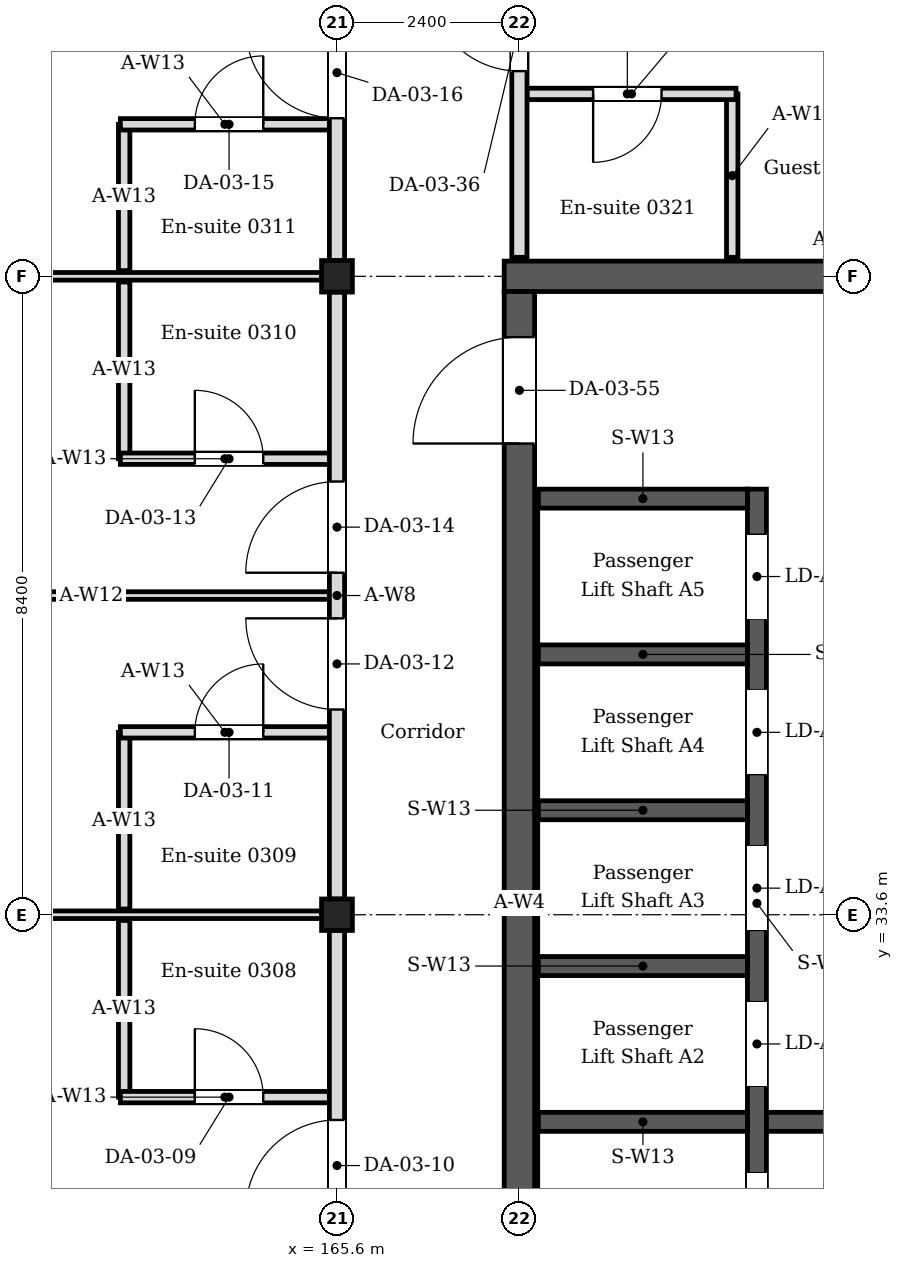
"""IFC4 building model, lengths in metres.
Left out: names, types, materials, properties, quantities, classifications, styles, units other than length and angle.
Written with IfcOpenShell. Run it as: python <this file> out.ifc"""

import sys

from ifc_helpers import new_model, si_unit, direction, frame, frame_2d, origin, origin_2d, place, context, subcontext, project, spatial, rectangle, i_section, extrude, element, fill, save


model = new_model("IFC4")
c1 = context("Model", 3, precision=1e-05, world=origin(), true_north=direction((0.0, 1.0)))
c2 = subcontext(c1, "Body", "Model", "MODEL_VIEW")
j1 = project(units=[si_unit("LENGTHUNIT", "METRE"), si_unit("PLANEANGLEUNIT", "RADIAN")], contexts=[c1])
p1 = place(None, origin())
s1 = spatial("IfcSite", under=j1, at=p1, CompositionType="ELEMENT")
p2 = place(p1, origin())
s2 = spatial("IfcBuilding", under=s1, at=p2, CompositionType="ELEMENT")
p3 = place(p2, frame((0.0, 0.0, 14.4)))
s3 = spatial("IfcBuildingStorey", under=s2, at=p3, CompositionType="ELEMENT", Elevation=14.4)
for number, where, z_axis, x_axis in (
    (1, (165.6, 33.6, 0.0), (0.0, 0.0, 1.0), (1.0, 0.0, 0.0)),
    (2, (165.6, 42.0, 0.0), (0.0, 0.0, 1.0), (1.0, 0.0, 0.0)),
):
    element("IfcColumn", number, at=place(p3, frame(where, z_axis=z_axis, x_axis=x_axis)), inside=s3, PredefinedType="COLUMN", context=c2, shape_type="SweptSolid", body=[
        extrude(i_section(OverallWidth=0.405, OverallDepth=0.414, WebThickness=0.018, FlangeThickness=0.028, FilletRadius=0.022, at=origin_2d()), origin(), (0.0, 0.0, 1.0), 4.2),
    ])
p4 = place(p3, frame((167.8, 42.0, 0.0), z_axis=(0.0, 0.0, 1.0), x_axis=(1.0, 0.0, 0.0)))
e3 = element("IfcWall", 3, at=p4, inside=s3, PredefinedType="SOLIDWALL", context=c2, shape_type="SweptSolid", body=[
    extrude(rectangle(XDim=8.8, YDim=0.4, at=frame_2d((4.4, 0.0))), origin(), (0.0, 0.0, 1.0), 4.05),
])
p5 = place(p3, frame((168.0, 25.4, 0.0), z_axis=(0.0, 0.0, 1.0), x_axis=(0.0, 1.0, 0.0)))
e4 = element("IfcWall", 4, at=p5, inside=s3, PredefinedType="SOLIDWALL", context=c2, shape_type="SweptSolid", body=[
    extrude(rectangle(XDim=16.4, YDim=0.4, at=frame_2d((8.2, 0.0))), origin(), (0.0, 0.0, 1.0), 4.05),
])
p6 = place(p5, frame((1.0, 0.0, 0.0)))
e5 = element("IfcOpeningElement", 5, at=p6, cuts=e4, PredefinedType="OPENING", context=c2, shape_type="SweptSolid", body=[
    extrude(rectangle(XDim=1.0, YDim=2.1, at=frame_2d((0.5, 1.05))), frame((0.0, 0.21, 0.0), z_axis=(0.0, -1.0, 0.0), x_axis=(1.0, 0.0, 0.0)), (0.0, 0.0, 1.0), 0.42),
])
p7 = place(p5, frame((14.4, 0.0, 0.0)))
e6 = element("IfcOpeningElement", 6, at=p7, cuts=e4, PredefinedType="OPENING", context=c2, shape_type="SweptSolid", body=[
    extrude(rectangle(XDim=1.4, YDim=2.1, at=frame_2d((0.7, 1.05))), frame((0.0, 0.21, 0.0), z_axis=(0.0, -1.0, 0.0), x_axis=(1.0, 0.0, 0.0)), (0.0, 0.0, 1.0), 0.42),
])
p8 = place(p3, frame((162.8, 31.2, 0.0), z_axis=(0.0, 0.0, 1.0), x_axis=(0.0, 1.0, 0.0)))
e7 = element("IfcWall", 7, at=p8, inside=s3, PredefinedType="PARTITIONING", context=c2, shape_type="SweptSolid", body=[
    extrude(rectangle(XDim=2.325, YDim=0.15, at=frame_2d((1.163, 0.0))), origin(), (0.0, 0.0, 1.0), 4.05),
])
p9 = place(p3, frame((162.75, 31.2, 0.0), z_axis=(0.0, 0.0, 1.0), x_axis=(1.0, 0.0, 0.0)))
e8 = element("IfcWall", 8, at=p9, inside=s3, PredefinedType="PARTITIONING", context=c2, shape_type="SweptSolid", body=[
    extrude(rectangle(XDim=2.75, YDim=0.15, at=frame_2d((1.375, 0.0))), origin(), (0.0, 0.0, 1.0), 4.05),
])
p10 = place(p9, frame((0.98, 0.0, 0.0)))
e9 = element("IfcOpeningElement", 9, at=p10, cuts=e8, PredefinedType="OPENING", context=c2, shape_type="SweptSolid", body=[
    extrude(rectangle(XDim=0.9, YDim=2.1, at=frame_2d((0.45, 1.05))), frame((0.0, 0.085, 0.0), z_axis=(0.0, -1.0, 0.0), x_axis=(1.0, 0.0, 0.0)), (0.0, 0.0, 1.0), 0.17),
])
p11 = place(p3, frame((162.8, 33.675, 0.0), z_axis=(0.0, 0.0, 1.0), x_axis=(0.0, 1.0, 0.0)))
e10 = element("IfcWall", 10, at=p11, inside=s3, PredefinedType="PARTITIONING", context=c2, shape_type="SweptSolid", body=[
    extrude(rectangle(XDim=2.325, YDim=0.15, at=frame_2d((1.163, 0.0))), origin(), (0.0, 0.0, 1.0), 4.05),
])
p12 = place(p3, frame((162.75, 36.0, 0.0), z_axis=(0.0, 0.0, 1.0), x_axis=(1.0, 0.0, 0.0)))
e11 = element("IfcWall", 11, at=p12, inside=s3, PredefinedType="PARTITIONING", context=c2, shape_type="SweptSolid", body=[
    extrude(rectangle(XDim=2.75, YDim=0.15, at=frame_2d((1.375, 0.0))), origin(), (0.0, 0.0, 1.0), 4.05),
])
p13 = place(p12, frame((0.98, 0.0, 0.0)))
e12 = element("IfcOpeningElement", 12, at=p13, cuts=e11, PredefinedType="OPENING", context=c2, shape_type="SweptSolid", body=[
    extrude(rectangle(XDim=0.9, YDim=2.1, at=frame_2d((0.45, 1.05))), frame((0.0, 0.085, 0.0), z_axis=(0.0, -1.0, 0.0), x_axis=(1.0, 0.0, 0.0)), (0.0, 0.0, 1.0), 0.17),
])
p14 = place(p3, frame((162.8, 39.6, 0.0), z_axis=(0.0, 0.0, 1.0), x_axis=(0.0, 1.0, 0.0)))
e13 = element("IfcWall", 13, at=p14, inside=s3, PredefinedType="PARTITIONING", context=c2, shape_type="SweptSolid", body=[
    extrude(rectangle(XDim=2.325, YDim=0.15, at=frame_2d((1.163, 0.0))), origin(), (0.0, 0.0, 1.0), 4.05),
])
p15 = place(p3, frame((162.75, 39.6, 0.0), z_axis=(0.0, 0.0, 1.0), x_axis=(1.0, 0.0, 0.0)))
e14 = element("IfcWall", 14, at=p15, inside=s3, PredefinedType="PARTITIONING", context=c2, shape_type="SweptSolid", body=[
    extrude(rectangle(XDim=2.75, YDim=0.15, at=frame_2d((1.375, 0.0))), origin(), (0.0, 0.0, 1.0), 4.05),
])
p16 = place(p15, frame((0.98, 0.0, 0.0)))
e15 = element("IfcOpeningElement", 15, at=p16, cuts=e14, PredefinedType="OPENING", context=c2, shape_type="SweptSolid", body=[
    extrude(rectangle(XDim=0.9, YDim=2.1, at=frame_2d((0.45, 1.05))), frame((0.0, 0.085, 0.0), z_axis=(0.0, -1.0, 0.0), x_axis=(1.0, 0.0, 0.0)), (0.0, 0.0, 1.0), 0.17),
])
p17 = place(p3, frame((162.8, 42.075, 0.0), z_axis=(0.0, 0.0, 1.0), x_axis=(0.0, 1.0, 0.0)))
e16 = element("IfcWall", 16, at=p17, inside=s3, PredefinedType="PARTITIONING", context=c2, shape_type="SweptSolid", body=[
    extrude(rectangle(XDim=1.925, YDim=0.15, at=frame_2d((0.962, 0.0))), origin(), (0.0, 0.0, 1.0), 4.05),
])
p18 = place(p3, frame((162.75, 44.0, 0.0), z_axis=(0.0, 0.0, 1.0), x_axis=(1.0, 0.0, 0.0)))
e17 = element("IfcWall", 17, at=p18, inside=s3, PredefinedType="PARTITIONING", context=c2, shape_type="SweptSolid", body=[
    extrude(rectangle(XDim=2.75, YDim=0.15, at=frame_2d((1.375, 0.0))), origin(), (0.0, 0.0, 1.0), 4.05),
])
p19 = place(p18, frame((0.98, 0.0, 0.0)))
e18 = element("IfcOpeningElement", 18, at=p19, cuts=e17, PredefinedType="OPENING", context=c2, shape_type="SweptSolid", body=[
    extrude(rectangle(XDim=0.9, YDim=2.1, at=frame_2d((0.45, 1.05))), frame((0.0, 0.085, 0.0), z_axis=(0.0, -1.0, 0.0), x_axis=(1.0, 0.0, 0.0)), (0.0, 0.0, 1.0), 0.17),
])
p20 = place(p3, frame((170.8, 42.25, 0.0), z_axis=(0.0, 0.0, 1.0), x_axis=(0.0, 1.0, 0.0)))
e19 = element("IfcWall", 19, at=p20, inside=s3, PredefinedType="PARTITIONING", context=c2, shape_type="SweptSolid", body=[
    extrude(rectangle(XDim=2.15, YDim=0.15, at=frame_2d((1.075, 0.0))), origin(), (0.0, 0.0, 1.0), 4.05),
])
p21 = place(p3, frame((170.85, 44.4, 0.0), z_axis=(0.0, 0.0, 1.0), x_axis=(-1.0, 0.0, 0.0)))
e20 = element("IfcWall", 20, at=p21, inside=s3, PredefinedType="PARTITIONING", context=c2, shape_type="SweptSolid", body=[
    extrude(rectangle(XDim=2.75, YDim=0.15, at=frame_2d((1.375, 0.0))), origin(), (0.0, 0.0, 1.0), 4.05),
])
p22 = place(p21, frame((0.98, 0.0, 0.0)))
e21 = element("IfcOpeningElement", 21, at=p22, cuts=e20, PredefinedType="OPENING", context=c2, shape_type="SweptSolid", body=[
    extrude(rectangle(XDim=0.9, YDim=2.1, at=frame_2d((0.45, 1.05))), frame((0.0, 0.085, 0.0), z_axis=(0.0, -1.0, 0.0), x_axis=(1.0, 0.0, 0.0)), (0.0, 0.0, 1.0), 0.17),
])
for number, where, z_axis, x_axis in (
    (22, (157.403, 33.6, 0.0), (0.0, 0.0, 1.0), (1.0, 0.0, 0.0)),
    (23, (157.403, 42.0, 0.0), (0.0, 0.0, 1.0), (1.0, 0.0, 0.0)),
):
    element("IfcWall", number, at=place(p3, frame(where, z_axis=z_axis, x_axis=x_axis)), inside=s3, PredefinedType="PARTITIONING", context=c2, shape_type="SweptSolid", body=[
        extrude(rectangle(XDim=7.995, YDim=0.1, at=frame_2d((3.998, 0.0))), origin(), (0.0, 0.0, 1.0), 3.604),
    ])
p23 = place(p3, frame((159.24, 37.8, 0.0), z_axis=(0.0, 0.0, 1.0), x_axis=(1.0, 0.0, 0.0)))
e24 = element("IfcWall", 24, at=p23, inside=s3, PredefinedType="PARTITIONING", context=c2, shape_type="SweptSolid", body=[
    extrude(rectangle(XDim=6.26, YDim=0.1, at=frame_2d((3.13, 0.0))), origin(), (0.0, 0.0, 1.0), 3.604),
])
p24 = place(p3, frame((165.6, 25.407, 0.0), z_axis=(0.0, 0.0, 1.0), x_axis=(0.0, 1.0, 0.0)))
e25 = element("IfcWall", 25, at=p24, inside=s3, PredefinedType="PARTITIONING", context=c2, shape_type="SweptSolid", body=[
    extrude(rectangle(XDim=7.986, YDim=0.2, at=frame_2d((3.993, 0.0))), origin(), (0.0, 0.0, 1.0), 3.45),
])
p25 = place(p24, frame((2.493, 0.0, 0.0)))
e26 = element("IfcOpeningElement", 26, at=p25, cuts=e25, PredefinedType="OPENING", context=c2, shape_type="SweptSolid", body=[
    extrude(rectangle(XDim=1.2, YDim=2.1, at=frame_2d((0.6, 1.05))), frame((0.0, 0.11, 0.0), z_axis=(0.0, -1.0, 0.0), x_axis=(1.0, 0.0, 0.0)), (0.0, 0.0, 1.0), 0.22),
])
p26 = place(p24, frame((4.293, 0.0, 0.0)))
e27 = element("IfcOpeningElement", 27, at=p26, cuts=e25, PredefinedType="OPENING", context=c2, shape_type="SweptSolid", body=[
    extrude(rectangle(XDim=1.2, YDim=2.1, at=frame_2d((0.6, 1.05))), frame((0.0, 0.11, 0.0), z_axis=(0.0, -1.0, 0.0), x_axis=(1.0, 0.0, 0.0)), (0.0, 0.0, 1.0), 0.22),
])
p27 = place(p3, frame((165.6, 33.807, 0.0), z_axis=(0.0, 0.0, 1.0), x_axis=(0.0, 1.0, 0.0)))
e28 = element("IfcWall", 28, at=p27, inside=s3, PredefinedType="PARTITIONING", context=c2, shape_type="SweptSolid", body=[
    extrude(rectangle(XDim=7.986, YDim=0.2, at=frame_2d((3.993, 0.0))), origin(), (0.0, 0.0, 1.0), 3.45),
])
p28 = place(p27, frame((2.493, 0.0, 0.0)))
e29 = element("IfcOpeningElement", 29, at=p28, cuts=e28, PredefinedType="OPENING", context=c2, shape_type="SweptSolid", body=[
    extrude(rectangle(XDim=1.2, YDim=2.1, at=frame_2d((0.6, 1.05))), frame((0.0, 0.11, 0.0), z_axis=(0.0, -1.0, 0.0), x_axis=(1.0, 0.0, 0.0)), (0.0, 0.0, 1.0), 0.22),
])
p29 = place(p27, frame((4.293, 0.0, 0.0)))
e30 = element("IfcOpeningElement", 30, at=p29, cuts=e28, PredefinedType="OPENING", context=c2, shape_type="SweptSolid", body=[
    extrude(rectangle(XDim=1.2, YDim=2.1, at=frame_2d((0.6, 1.05))), frame((0.0, 0.11, 0.0), z_axis=(0.0, -1.0, 0.0), x_axis=(1.0, 0.0, 0.0)), (0.0, 0.0, 1.0), 0.22),
])
p30 = place(p3, frame((165.6, 42.207, 0.0), z_axis=(0.0, 0.0, 1.0), x_axis=(0.0, 1.0, 0.0)))
e31 = element("IfcWall", 31, at=p30, inside=s3, PredefinedType="PARTITIONING", context=c2, shape_type="SweptSolid", body=[
    extrude(rectangle(XDim=7.986, YDim=0.2, at=frame_2d((3.993, 0.0))), origin(), (0.0, 0.0, 1.0), 3.45),
])
p31 = place(p30, frame((1.873, 0.0, 0.0)))
e32 = element("IfcOpeningElement", 32, at=p31, cuts=e31, PredefinedType="OPENING", context=c2, shape_type="SweptSolid", body=[
    extrude(rectangle(XDim=1.2, YDim=2.1, at=frame_2d((0.6, 1.05))), frame((0.0, 0.11, 0.0), z_axis=(0.0, -1.0, 0.0), x_axis=(1.0, 0.0, 0.0)), (0.0, 0.0, 1.0), 0.22),
])
p32 = place(p30, frame((3.873, 0.0, 0.0)))
e33 = element("IfcOpeningElement", 33, at=p32, cuts=e31, PredefinedType="OPENING", context=c2, shape_type="SweptSolid", body=[
    extrude(rectangle(XDim=1.2, YDim=2.1, at=frame_2d((0.6, 1.05))), frame((0.0, 0.11, 0.0), z_axis=(0.0, -1.0, 0.0), x_axis=(1.0, 0.0, 0.0)), (0.0, 0.0, 1.0), 0.22),
])
p33 = place(p3, frame((168.0, 42.25, 0.0), z_axis=(0.0, 0.0, 1.0), x_axis=(0.0, 1.0, 0.0)))
e34 = element("IfcWall", 34, at=p33, inside=s3, PredefinedType="PARTITIONING", context=c2, shape_type="SweptSolid", body=[
    extrude(rectangle(XDim=7.943, YDim=0.2, at=frame_2d((3.972, 0.0))), origin(), (0.0, 0.0, 1.0), 3.45),
])
p34 = place(p33, frame((2.45, 0.0, 0.0)))
e35 = element("IfcOpeningElement", 35, at=p34, cuts=e34, PredefinedType="OPENING", context=c2, shape_type="SweptSolid", body=[
    extrude(rectangle(XDim=1.2, YDim=2.1, at=frame_2d((0.6, 1.05))), frame((0.0, 0.11, 0.0), z_axis=(0.0, -1.0, 0.0), x_axis=(1.0, 0.0, 0.0)), (0.0, 0.0, 1.0), 0.22),
])
p35 = place(p33, frame((4.25, 0.0, 0.0)))
e36 = element("IfcOpeningElement", 36, at=p35, cuts=e34, PredefinedType="OPENING", context=c2, shape_type="SweptSolid", body=[
    extrude(rectangle(XDim=1.2, YDim=2.1, at=frame_2d((0.6, 1.05))), frame((0.0, 0.11, 0.0), z_axis=(0.0, -1.0, 0.0), x_axis=(1.0, 0.0, 0.0)), (0.0, 0.0, 1.0), 0.22),
])
p36 = place(p3, frame((171.125, 28.3, 0.0), z_axis=(0.0, 0.0, 1.0), x_axis=(0.0, 1.0, 0.0)))
e37 = element("IfcWall", 37, at=p36, inside=s3, PredefinedType="SOLIDWALL", context=c2, shape_type="SweptSolid", body=[
    extrude(rectangle(XDim=10.9, YDim=0.25, at=frame_2d((5.45, 0.0))), origin(), (0.0, 0.0, 1.0), 4.05),
])
p37 = place(p36, frame((0.8, 0.0, 0.0)))
e38 = element("IfcOpeningElement", 38, at=p37, cuts=e37, PredefinedType="OPENING", context=c2, shape_type="SweptSolid", body=[
    extrude(rectangle(XDim=1.1, YDim=2.1, at=frame_2d((0.55, 1.05))), frame((0.0, 0.135, 0.0), z_axis=(0.0, -1.0, 0.0), x_axis=(1.0, 0.0, 0.0)), (0.0, 0.0, 1.0), 0.27),
])
p38 = place(p36, frame((3.05, 0.0, 0.0)))
e39 = element("IfcOpeningElement", 39, at=p38, cuts=e37, PredefinedType="OPENING", context=c2, shape_type="SweptSolid", body=[
    extrude(rectangle(XDim=1.1, YDim=2.1, at=frame_2d((0.55, 1.05))), frame((0.0, 0.135, 0.0), z_axis=(0.0, -1.0, 0.0), x_axis=(1.0, 0.0, 0.0)), (0.0, 0.0, 1.0), 0.27),
])
p39 = place(p36, frame((5.1, 0.0, 0.0)))
e40 = element("IfcOpeningElement", 40, at=p39, cuts=e37, PredefinedType="OPENING", context=c2, shape_type="SweptSolid", body=[
    extrude(rectangle(XDim=1.1, YDim=2.1, at=frame_2d((0.55, 1.05))), frame((0.0, 0.135, 0.0), z_axis=(0.0, -1.0, 0.0), x_axis=(1.0, 0.0, 0.0)), (0.0, 0.0, 1.0), 0.27),
])
p40 = place(p36, frame((7.15, 0.0, 0.0)))
e41 = element("IfcOpeningElement", 41, at=p40, cuts=e37, PredefinedType="OPENING", context=c2, shape_type="SweptSolid", body=[
    extrude(rectangle(XDim=1.1, YDim=2.1, at=frame_2d((0.55, 1.05))), frame((0.0, 0.135, 0.0), z_axis=(0.0, -1.0, 0.0), x_axis=(1.0, 0.0, 0.0)), (0.0, 0.0, 1.0), 0.27),
])
p41 = place(p36, frame((9.2, 0.0, 0.0)))
e42 = element("IfcOpeningElement", 42, at=p41, cuts=e37, PredefinedType="OPENING", context=c2, shape_type="SweptSolid", body=[
    extrude(rectangle(XDim=1.1, YDim=2.1, at=frame_2d((0.55, 1.05))), frame((0.0, 0.135, 0.0), z_axis=(0.0, -1.0, 0.0), x_axis=(1.0, 0.0, 0.0)), (0.0, 0.0, 1.0), 0.27),
])
for number, where, z_axis, x_axis in (
    (43, (168.25, 30.875, 0.0), (0.0, 0.0, 1.0), (1.0, 0.0, 0.0)),
    (44, (168.25, 32.925, 0.0), (0.0, 0.0, 1.0), (1.0, 0.0, 0.0)),
    (45, (168.25, 34.975, 0.0), (0.0, 0.0, 1.0), (1.0, 0.0, 0.0)),
    (46, (168.25, 37.025, 0.0), (0.0, 0.0, 1.0), (1.0, 0.0, 0.0)),
    (47, (168.25, 39.075, 0.0), (0.0, 0.0, 1.0), (1.0, 0.0, 0.0)),
):
    element("IfcWall", number, at=place(p3, frame(where, z_axis=z_axis, x_axis=x_axis)), inside=s3, PredefinedType="SOLIDWALL", context=c2, shape_type="SweptSolid", body=[
        extrude(rectangle(XDim=2.75, YDim=0.25, at=frame_2d((1.375, 0.0))), origin(), (0.0, 0.0, 1.0), 4.05),
    ])
p42 = place(p3, frame((171.25, 30.875, 0.0), z_axis=(0.0, 0.0, 1.0), x_axis=(1.0, 0.0, 0.0)))
e48 = element("IfcWall", 48, at=p42, inside=s3, PredefinedType="SOLIDWALL", context=c2, shape_type="SweptSolid", body=[
    extrude(rectangle(XDim=4.9, YDim=0.25, at=frame_2d((2.45, 0.0))), origin(), (0.0, 0.0, 1.0), 4.05),
])
p43 = place(p10, origin())
e49 = element("IfcDoor", 49, at=p43, inside=s3, OperationType="SINGLE_SWING_LEFT", PredefinedType="DOOR", context=c2, shape_type="SweptSolid", body=[
    extrude(rectangle(XDim=0.9, YDim=2.1, at=frame_2d((0.45, 1.05))), frame((0.0, 0.025, 0.0), z_axis=(0.0, -1.0, 0.0), x_axis=(1.0, 0.0, 0.0)), (0.0, 0.0, 1.0), 0.05),
])
fill(e9, e49)
p44 = place(p26, origin())
e50 = element("IfcDoor", 50, at=p44, inside=s3, OperationType="SINGLE_SWING_LEFT", PredefinedType="DOOR", context=c2, shape_type="SweptSolid", body=[
    extrude(rectangle(XDim=1.2, YDim=2.1, at=frame_2d((0.6, 1.05))), frame((0.0, 0.025, 0.0), z_axis=(0.0, -1.0, 0.0), x_axis=(1.0, 0.0, 0.0)), (0.0, 0.0, 1.0), 0.05),
])
fill(e27, e50)
p45 = place(p13, origin())
e51 = element("IfcDoor", 51, at=p45, inside=s3, OperationType="SINGLE_SWING_RIGHT", PredefinedType="DOOR", context=c2, shape_type="SweptSolid", body=[
    extrude(rectangle(XDim=0.9, YDim=2.1, at=frame_2d((0.45, 1.05))), frame((0.0, 0.025, 0.0), z_axis=(0.0, -1.0, 0.0), x_axis=(1.0, 0.0, 0.0)), (0.0, 0.0, 1.0), 0.05),
])
fill(e12, e51)
p46 = place(p28, origin())
e52 = element("IfcDoor", 52, at=p46, inside=s3, OperationType="SINGLE_SWING_RIGHT", PredefinedType="DOOR", context=c2, shape_type="SweptSolid", body=[
    extrude(rectangle(XDim=1.2, YDim=2.1, at=frame_2d((0.6, 1.05))), frame((0.0, 0.025, 0.0), z_axis=(0.0, -1.0, 0.0), x_axis=(1.0, 0.0, 0.0)), (0.0, 0.0, 1.0), 0.05),
])
fill(e29, e52)
p47 = place(p16, origin())
e53 = element("IfcDoor", 53, at=p47, inside=s3, OperationType="SINGLE_SWING_LEFT", PredefinedType="DOOR", context=c2, shape_type="SweptSolid", body=[
    extrude(rectangle(XDim=0.9, YDim=2.1, at=frame_2d((0.45, 1.05))), frame((0.0, 0.025, 0.0), z_axis=(0.0, -1.0, 0.0), x_axis=(1.0, 0.0, 0.0)), (0.0, 0.0, 1.0), 0.05),
])
fill(e15, e53)
p48 = place(p29, origin())
e54 = element("IfcDoor", 54, at=p48, inside=s3, OperationType="SINGLE_SWING_LEFT", PredefinedType="DOOR", context=c2, shape_type="SweptSolid", body=[
    extrude(rectangle(XDim=1.2, YDim=2.1, at=frame_2d((0.6, 1.05))), frame((0.0, 0.025, 0.0), z_axis=(0.0, -1.0, 0.0), x_axis=(1.0, 0.0, 0.0)), (0.0, 0.0, 1.0), 0.05),
])
fill(e30, e54)
p49 = place(p19, origin())
e55 = element("IfcDoor", 55, at=p49, inside=s3, OperationType="SINGLE_SWING_RIGHT", PredefinedType="DOOR", context=c2, shape_type="SweptSolid", body=[
    extrude(rectangle(XDim=0.9, YDim=2.1, at=frame_2d((0.45, 1.05))), frame((0.0, 0.025, 0.0), z_axis=(0.0, -1.0, 0.0), x_axis=(1.0, 0.0, 0.0)), (0.0, 0.0, 1.0), 0.05),
])
fill(e18, e55)
p50 = place(p31, origin())
e56 = element("IfcDoor", 56, at=p50, inside=s3, OperationType="SINGLE_SWING_RIGHT", PredefinedType="DOOR", context=c2, shape_type="SweptSolid", body=[
    extrude(rectangle(XDim=1.2, YDim=2.1, at=frame_2d((0.6, 1.05))), frame((0.0, 0.025, 0.0), z_axis=(0.0, -1.0, 0.0), x_axis=(1.0, 0.0, 0.0)), (0.0, 0.0, 1.0), 0.05),
])
fill(e32, e56)
p51 = place(p22, origin())
e57 = element("IfcDoor", 57, at=p51, inside=s3, OperationType="SINGLE_SWING_RIGHT", PredefinedType="DOOR", context=c2, shape_type="SweptSolid", body=[
    extrude(rectangle(XDim=0.9, YDim=2.1, at=frame_2d((0.45, 1.05))), frame((0.0, 0.025, 0.0), z_axis=(0.0, -1.0, 0.0), x_axis=(1.0, 0.0, 0.0)), (0.0, 0.0, 1.0), 0.05),
])
fill(e21, e57)
p52 = place(p34, origin())
e58 = element("IfcDoor", 58, at=p52, inside=s3, OperationType="SINGLE_SWING_RIGHT", PredefinedType="DOOR", context=c2, shape_type="SweptSolid", body=[
    extrude(rectangle(XDim=1.2, YDim=2.1, at=frame_2d((0.6, 1.05))), frame((0.0, 0.025, 0.0), z_axis=(0.0, -1.0, 0.0), x_axis=(1.0, 0.0, 0.0)), (0.0, 0.0, 1.0), 0.05),
])
fill(e35, e58)
p53 = place(p37, origin())
e59 = element("IfcDoor", 59, at=p53, inside=s3, OperationType="SLIDING_TO_LEFT", PredefinedType="DOOR", context=c2, shape_type="SweptSolid", body=[
    extrude(rectangle(XDim=1.1, YDim=2.1, at=frame_2d((0.55, 1.05))), frame((0.0, 0.025, 0.0), z_axis=(0.0, -1.0, 0.0), x_axis=(1.0, 0.0, 0.0)), (0.0, 0.0, 1.0), 0.05),
])
fill(e38, e59)
p54 = place(p38, origin())
e60 = element("IfcDoor", 60, at=p54, inside=s3, OperationType="SLIDING_TO_LEFT", PredefinedType="DOOR", context=c2, shape_type="SweptSolid", body=[
    extrude(rectangle(XDim=1.1, YDim=2.1, at=frame_2d((0.55, 1.05))), frame((0.0, 0.025, 0.0), z_axis=(0.0, -1.0, 0.0), x_axis=(1.0, 0.0, 0.0)), (0.0, 0.0, 1.0), 0.05),
])
fill(e39, e60)
p55 = place(p39, origin())
e61 = element("IfcDoor", 61, at=p55, inside=s3, OperationType="SLIDING_TO_LEFT", PredefinedType="DOOR", context=c2, shape_type="SweptSolid", body=[
    extrude(rectangle(XDim=1.1, YDim=2.1, at=frame_2d((0.55, 1.05))), frame((0.0, 0.025, 0.0), z_axis=(0.0, -1.0, 0.0), x_axis=(1.0, 0.0, 0.0)), (0.0, 0.0, 1.0), 0.05),
])
fill(e40, e61)
p56 = place(p40, origin())
e62 = element("IfcDoor", 62, at=p56, inside=s3, OperationType="SLIDING_TO_LEFT", PredefinedType="DOOR", context=c2, shape_type="SweptSolid", body=[
    extrude(rectangle(XDim=1.1, YDim=2.1, at=frame_2d((0.55, 1.05))), frame((0.0, 0.025, 0.0), z_axis=(0.0, -1.0, 0.0), x_axis=(1.0, 0.0, 0.0)), (0.0, 0.0, 1.0), 0.05),
])
fill(e41, e62)
p57 = place(p41, origin())
e63 = element("IfcDoor", 63, at=p57, inside=s3, OperationType="SLIDING_TO_LEFT", PredefinedType="DOOR", context=c2, shape_type="SweptSolid", body=[
    extrude(rectangle(XDim=1.1, YDim=2.1, at=frame_2d((0.55, 1.05))), frame((0.0, 0.025, 0.0), z_axis=(0.0, -1.0, 0.0), x_axis=(1.0, 0.0, 0.0)), (0.0, 0.0, 1.0), 0.05),
])
fill(e42, e63)
p58 = place(p7, origin())
e64 = element("IfcDoor", 64, at=p58, inside=s3, OperationType="DOUBLE_DOOR_DOUBLE_SWING", PredefinedType="DOOR", context=c2, shape_type="SweptSolid", body=[
    extrude(rectangle(XDim=1.4, YDim=2.1, at=frame_2d((0.7, 1.05))), frame((0.0, 0.025, 0.0), z_axis=(0.0, -1.0, 0.0), x_axis=(1.0, 0.0, 0.0)), (0.0, 0.0, 1.0), 0.05),
])
fill(e6, e64)
save(model, sys.argv[1])
